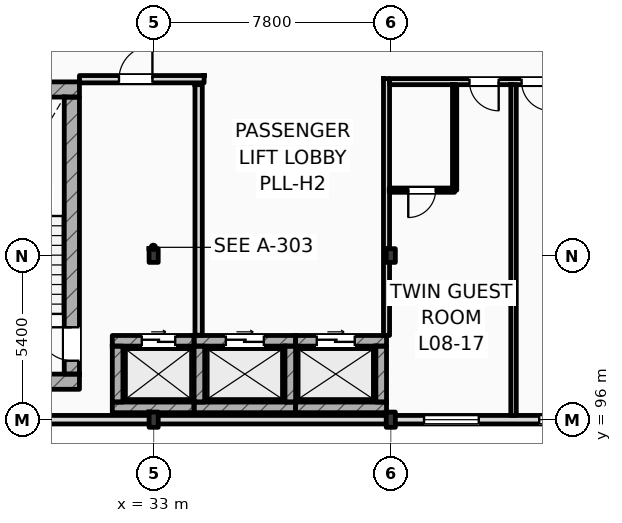
"""IFC4 building model, lengths in metres.
Left out: names, types, materials, properties, quantities, classifications, styles, units other than length and angle.
Written with IfcOpenShell. Run it as: python <this file> out.ifc"""

import sys

from ifc_helpers import new_model, si_unit, direction, frame, frame_2d, origin, origin_2d, place, context, subcontext, project, spatial, rectangle, i_section, extrude, element, fill, save


model = new_model("IFC4")
c1 = context("Model", 3, precision=1e-05, world=origin(), true_north=direction((0.0, 1.0)))
c2 = subcontext(c1, "Body", "Model", "MODEL_VIEW")
j1 = project(units=[si_unit("LENGTHUNIT", "METRE"), si_unit("PLANEANGLEUNIT", "RADIAN")], contexts=[c1])
p1 = place(None, origin())
s1 = spatial("IfcSite", under=j1, at=p1, CompositionType="ELEMENT")
p2 = place(p1, origin())
s2 = spatial("IfcBuilding", under=s1, at=p2, CompositionType="ELEMENT")
p3 = place(p2, frame((0.0, 0.0, 35.4)))
s3 = spatial("IfcBuildingStorey", under=s2, at=p3, CompositionType="ELEMENT", Elevation=35.4)
p4 = place(p3, frame((33.0, 96.0, 0.0), z_axis=(0.0, 0.0, 1.0), x_axis=(1.0, 0.0, 0.0)))
e1 = element("IfcColumn", 1, at=p4, inside=s3, PredefinedType="COLUMN", context=c2, shape_type="SweptSolid", body=[
    extrude(i_section(OverallWidth=0.3, OverallDepth=0.5, WebThickness=0.014, FlangeThickness=0.028, FilletRadius=0.027, at=origin_2d()), origin(), (0.0, 0.0, 1.0), 3.6),
])
p5 = place(p3, frame((33.0, 101.4, 0.0), z_axis=(0.0, 0.0, 1.0), x_axis=(1.0, 0.0, 0.0)))
e2 = element("IfcColumn", 2, at=p5, inside=s3, PredefinedType="COLUMN", context=c2, shape_type="SweptSolid", body=[
    extrude(i_section(OverallWidth=0.3, OverallDepth=0.45, WebThickness=0.014, FlangeThickness=0.026, FilletRadius=0.027, at=origin_2d()), origin(), (0.0, 0.0, 1.0), 3.6),
])
p6 = place(p3, frame((40.8, 96.0, 0.0), z_axis=(0.0, 0.0, 1.0), x_axis=(1.0, 0.0, 0.0)))
e3 = element("IfcColumn", 3, at=p6, inside=s3, PredefinedType="COLUMN", context=c2, shape_type="SweptSolid", body=[
    extrude(i_section(OverallWidth=0.3, OverallDepth=0.5, WebThickness=0.014, FlangeThickness=0.028, FilletRadius=0.027, at=origin_2d()), origin(), (0.0, 0.0, 1.0), 3.6),
])
p7 = place(p3, frame((40.8, 101.4, 0.0), z_axis=(0.0, 0.0, 1.0), x_axis=(1.0, 0.0, 0.0)))
e4 = element("IfcColumn", 4, at=p7, inside=s3, PredefinedType="COLUMN", context=c2, shape_type="SweptSolid", body=[
    extrude(i_section(OverallWidth=0.3, OverallDepth=0.45, WebThickness=0.014, FlangeThickness=0.026, FilletRadius=0.027, at=origin_2d()), origin(), (0.0, 0.0, 1.0), 3.6),
])
for number, where, z_axis, x_axis in (
    (5, (25.4, 106.862, 0.0), (0.0, 0.0, 1.0), (1.0, 0.0, 0.0)),
    (6, (25.4, 97.25, 0.0), (0.0, 0.0, 1.0), (1.0, 0.0, 0.0)),
):
    element("IfcWall", number, at=place(p3, frame(where, z_axis=z_axis, x_axis=x_axis)), inside=s3, PredefinedType="SHEAR", context=c2, shape_type="SweptSolid", body=[
        extrude(rectangle(XDim=5.16, YDim=0.5, at=frame_2d((2.58, 0.0))), origin(), (0.0, 0.0, 1.0), 3.6),
    ])
p8 = place(p3, frame((30.31, 97.5, 0.0), z_axis=(0.0, 0.0, 1.0), x_axis=(0.0, 1.0, 0.0)))
e7 = element("IfcWall", 7, at=p8, inside=s3, PredefinedType="SHEAR", context=c2, shape_type="SweptSolid", body=[
    extrude(rectangle(XDim=9.112, YDim=0.5, at=frame_2d((4.556, 0.0))), origin(), (0.0, 0.0, 1.0), 3.6),
])
p9 = place(p8, frame((0.44, 0.0, 0.0)))
e8 = element("IfcOpeningElement", 8, at=p9, cuts=e7, PredefinedType="OPENING", context=c2, shape_type="SweptSolid", body=[
    extrude(rectangle(XDim=1.1, YDim=2.2, at=frame_2d((0.55, 1.1))), frame((0.0, 0.26, 0.0), z_axis=(0.0, -1.0, 0.0), x_axis=(1.0, 0.0, 0.0)), (0.0, 0.0, 1.0), 0.52),
])
p10 = place(p3, frame((25.2, 96.0, 0.0), z_axis=(0.0, 0.0, 1.0), x_axis=(1.0, 0.0, 0.0)))
e9 = element("IfcWall", 9, at=p10, inside=s3, PredefinedType="STANDARD", context=c2, shape_type="SweptSolid", body=[
    extrude(rectangle(XDim=70.2, YDim=0.28, at=frame_2d((35.1, 0.0))), origin(), (0.0, 0.0, 1.0), 2.92),
])
p11 = place(p10, frame((16.694, 0.0, 0.9)))
e10 = element("IfcOpeningElement", 10, at=p11, cuts=e9, PredefinedType="OPENING", context=c2, shape_type="SweptSolid", body=[
    extrude(rectangle(XDim=1.8, YDim=1.84, at=frame_2d((0.9, 0.92))), frame((0.0, 0.15, 0.0), z_axis=(0.0, -1.0, 0.0), x_axis=(1.0, 0.0, 0.0)), (0.0, 0.0, 1.0), 0.3),
])
p12 = place(p10, frame((20.482, 0.0, 0.9)))
e11 = element("IfcOpeningElement", 11, at=p12, cuts=e9, PredefinedType="OPENING", context=c2, shape_type="SweptSolid", body=[
    extrude(rectangle(XDim=1.95, YDim=1.84, at=frame_2d((0.975, 0.92))), frame((0.0, 0.15, 0.0), z_axis=(0.0, -1.0, 0.0), x_axis=(1.0, 0.0, 0.0)), (0.0, 0.0, 1.0), 0.3),
])
p13 = place(p10, frame((24.316, 0.0, 0.9)))
e12 = element("IfcOpeningElement", 12, at=p13, cuts=e9, PredefinedType="OPENING", context=c2, shape_type="SweptSolid", body=[
    extrude(rectangle(XDim=2.1, YDim=1.84, at=frame_2d((1.05, 0.92))), frame((0.0, 0.15, 0.0), z_axis=(0.0, -1.0, 0.0), x_axis=(1.0, 0.0, 0.0)), (0.0, 0.0, 1.0), 0.3),
])
p14 = place(p10, frame((28.149, 0.0, 0.9)))
e13 = element("IfcOpeningElement", 13, at=p14, cuts=e9, PredefinedType="OPENING", context=c2, shape_type="SweptSolid", body=[
    extrude(rectangle(XDim=2.25, YDim=1.84, at=frame_2d((1.125, 0.92))), frame((0.0, 0.15, 0.0), z_axis=(0.0, -1.0, 0.0), x_axis=(1.0, 0.0, 0.0)), (0.0, 0.0, 1.0), 0.3),
])
p15 = place(p10, frame((31.983, 0.0, 0.9)))
e14 = element("IfcOpeningElement", 14, at=p15, cuts=e9, PredefinedType="OPENING", context=c2, shape_type="SweptSolid", body=[
    extrude(rectangle(XDim=2.4, YDim=1.84, at=frame_2d((1.2, 0.92))), frame((0.0, 0.15, 0.0), z_axis=(0.0, -1.0, 0.0), x_axis=(1.0, 0.0, 0.0)), (0.0, 0.0, 1.0), 0.3),
])
p16 = place(p10, frame((35.682, 0.0, 0.9)))
e15 = element("IfcOpeningElement", 15, at=p16, cuts=e9, PredefinedType="OPENING", context=c2, shape_type="SweptSolid", body=[
    extrude(rectangle(XDim=2.508, YDim=1.84, at=frame_2d((1.254, 0.92))), frame((0.0, 0.15, 0.0), z_axis=(0.0, -1.0, 0.0), x_axis=(1.0, 0.0, 0.0)), (0.0, 0.0, 1.0), 0.3),
])
p17 = place(p10, frame((55.56, 0.0, 0.9)))
e16 = element("IfcOpeningElement", 16, at=p17, cuts=e9, PredefinedType="OPENING", context=c2, shape_type="SweptSolid", body=[
    extrude(rectangle(XDim=1.8, YDim=1.84, at=frame_2d((0.9, 0.92))), frame((0.0, 0.15, 0.0), z_axis=(0.0, -1.0, 0.0), x_axis=(1.0, 0.0, 0.0)), (0.0, 0.0, 1.0), 0.3),
])
p18 = place(p10, frame((58.628, 0.0, 0.9)))
e17 = element("IfcOpeningElement", 17, at=p18, cuts=e9, PredefinedType="OPENING", context=c2, shape_type="SweptSolid", body=[
    extrude(rectangle(XDim=2.809, YDim=1.84, at=frame_2d((1.405, 0.92))), frame((0.0, 0.15, 0.0), z_axis=(0.0, -1.0, 0.0), x_axis=(1.0, 0.0, 0.0)), (0.0, 0.0, 1.0), 0.3),
])
p19 = place(p10, frame((63.257, 0.0, 0.9)))
e18 = element("IfcOpeningElement", 18, at=p19, cuts=e9, PredefinedType="OPENING", context=c2, shape_type="SweptSolid", body=[
    extrude(rectangle(XDim=1.8, YDim=1.84, at=frame_2d((0.9, 0.92))), frame((0.0, 0.15, 0.0), z_axis=(0.0, -1.0, 0.0), x_axis=(1.0, 0.0, 0.0)), (0.0, 0.0, 1.0), 0.3),
])
p20 = place(p10, frame((66.453, 0.0, 0.9)))
e19 = element("IfcOpeningElement", 19, at=p20, cuts=e9, PredefinedType="OPENING", context=c2, shape_type="SweptSolid", body=[
    extrude(rectangle(XDim=2.737, YDim=1.84, at=frame_2d((1.369, 0.92))), frame((0.0, 0.15, 0.0), z_axis=(0.0, -1.0, 0.0), x_axis=(1.0, 0.0, 0.0)), (0.0, 0.0, 1.0), 0.3),
])
p21 = place(p3, frame((31.64, 98.595, 0.0), z_axis=(0.0, 0.0, 1.0), x_axis=(1.0, 0.0, 0.0)))
e20 = element("IfcWall", 20, at=p21, inside=s3, PredefinedType="SHEAR", context=c2, shape_type="SweptSolid", body=[
    extrude(rectangle(XDim=2.69, YDim=0.35, at=frame_2d((1.345, 0.0))), origin(), (0.0, 0.0, 1.0), 3.38),
])
p22 = place(p21, frame((0.97, 0.0, 0.0)))
e21 = element("IfcOpeningElement", 21, at=p22, cuts=e20, PredefinedType="OPENING", context=c2, shape_type="SweptSolid", body=[
    extrude(rectangle(XDim=1.1, YDim=2.2, at=frame_2d((0.55, 1.1))), frame((0.0, 0.185, 0.0), z_axis=(0.0, -1.0, 0.0), x_axis=(1.0, 0.0, 0.0)), (0.0, 0.0, 1.0), 0.37),
])
p23 = place(p3, frame((31.64, 96.405, 0.0), z_axis=(0.0, 0.0, 1.0), x_axis=(1.0, 0.0, 0.0)))
e22 = element("IfcWall", 22, at=p23, inside=s3, PredefinedType="SHEAR", context=c2, shape_type="SweptSolid", body=[
    extrude(rectangle(XDim=2.69, YDim=0.35, at=frame_2d((1.345, 0.0))), origin(), (0.0, 0.0, 1.0), 3.38),
])
p24 = place(p3, frame((31.815, 96.58, 0.0), z_axis=(0.0, 0.0, 1.0), x_axis=(0.0, 1.0, 0.0)))
e23 = element("IfcWall", 23, at=p24, inside=s3, PredefinedType="SHEAR", context=c2, shape_type="SweptSolid", body=[
    extrude(rectangle(XDim=1.84, YDim=0.35, at=frame_2d((0.92, 0.0))), origin(), (0.0, 0.0, 1.0), 3.38),
])
p25 = place(p3, frame((34.33, 98.595, 0.0), z_axis=(0.0, 0.0, 1.0), x_axis=(1.0, 0.0, 0.0)))
e24 = element("IfcWall", 24, at=p25, inside=s3, PredefinedType="SHEAR", context=c2, shape_type="SweptSolid", body=[
    extrude(rectangle(XDim=3.34, YDim=0.35, at=frame_2d((1.67, 0.0))), origin(), (0.0, 0.0, 1.0), 3.38),
])
p26 = place(p25, frame((1.045, 0.0, 0.0)))
e25 = element("IfcOpeningElement", 25, at=p26, cuts=e24, PredefinedType="OPENING", context=c2, shape_type="SweptSolid", body=[
    extrude(rectangle(XDim=1.25, YDim=2.25, at=frame_2d((0.625, 1.125))), frame((0.0, 0.185, 0.0), z_axis=(0.0, -1.0, 0.0), x_axis=(1.0, 0.0, 0.0)), (0.0, 0.0, 1.0), 0.37),
])
p27 = place(p3, frame((34.33, 96.405, 0.0), z_axis=(0.0, 0.0, 1.0), x_axis=(1.0, 0.0, 0.0)))
e26 = element("IfcWall", 26, at=p27, inside=s3, PredefinedType="SHEAR", context=c2, shape_type="SweptSolid", body=[
    extrude(rectangle(XDim=3.34, YDim=0.35, at=frame_2d((1.67, 0.0))), origin(), (0.0, 0.0, 1.0), 3.38),
])
for number, where, z_axis, x_axis in (
    (27, (34.505, 96.58, 0.0), (0.0, 0.0, 1.0), (0.0, 1.0, 0.0)),
    (28, (37.495, 96.58, 0.0), (0.0, 0.0, 1.0), (0.0, 1.0, 0.0)),
):
    element("IfcWall", number, at=place(p3, frame(where, z_axis=z_axis, x_axis=x_axis)), inside=s3, PredefinedType="SHEAR", context=c2, shape_type="SweptSolid", body=[
        extrude(rectangle(XDim=1.84, YDim=0.35, at=frame_2d((0.92, 0.0))), origin(), (0.0, 0.0, 1.0), 3.38),
    ])
p28 = place(p3, frame((37.67, 98.595, 0.0), z_axis=(0.0, 0.0, 1.0), x_axis=(1.0, 0.0, 0.0)))
e29 = element("IfcWall", 29, at=p28, inside=s3, PredefinedType="SHEAR", context=c2, shape_type="SweptSolid", body=[
    extrude(rectangle(XDim=2.99, YDim=0.35, at=frame_2d((1.495, 0.0))), origin(), (0.0, 0.0, 1.0), 3.38),
])
p29 = place(p28, frame((0.695, 0.0, 0.0)))
e30 = element("IfcOpeningElement", 30, at=p29, cuts=e29, PredefinedType="OPENING", context=c2, shape_type="SweptSolid", body=[
    extrude(rectangle(XDim=1.25, YDim=2.25, at=frame_2d((0.625, 1.125))), frame((0.0, 0.185, 0.0), z_axis=(0.0, -1.0, 0.0), x_axis=(1.0, 0.0, 0.0)), (0.0, 0.0, 1.0), 0.37),
])
p30 = place(p3, frame((37.67, 96.405, 0.0), z_axis=(0.0, 0.0, 1.0), x_axis=(1.0, 0.0, 0.0)))
e31 = element("IfcWall", 31, at=p30, inside=s3, PredefinedType="SHEAR", context=c2, shape_type="SweptSolid", body=[
    extrude(rectangle(XDim=2.99, YDim=0.35, at=frame_2d((1.495, 0.0))), origin(), (0.0, 0.0, 1.0), 3.38),
])
p31 = place(p3, frame((40.485, 96.58, 0.0), z_axis=(0.0, 0.0, 1.0), x_axis=(0.0, 1.0, 0.0)))
e32 = element("IfcWall", 32, at=p31, inside=s3, PredefinedType="SHEAR", context=c2, shape_type="SweptSolid", body=[
    extrude(rectangle(XDim=1.84, YDim=0.35, at=frame_2d((0.92, 0.0))), origin(), (0.0, 0.0, 1.0), 3.01),
])
p32 = place(p3, frame((34.48, 98.78, 0.0), z_axis=(0.0, 0.0, 1.0), x_axis=(0.0, 1.0, 0.0)))
e33 = element("IfcWall", 33, at=p32, inside=s3, PredefinedType="STANDARD", context=c2, shape_type="SweptSolid", body=[
    extrude(rectangle(XDim=8.24, YDim=0.24, at=frame_2d((4.12, 0.0))), origin(), (0.0, 0.0, 1.0), 3.38),
])
p33 = place(p3, frame((30.56, 107.2, 0.0), z_axis=(0.0, 0.0, 1.0), x_axis=(1.0, 0.0, 0.0)))
e34 = element("IfcWall", 34, at=p33, inside=s3, PredefinedType="STANDARD", context=c2, shape_type="SweptSolid", body=[
    extrude(rectangle(XDim=4.1, YDim=0.24, at=frame_2d((2.05, 0.0))), origin(), (0.0, 0.0, 1.0), 3.38),
])
p34 = place(p33, frame((1.3, 0.0, 0.0)))
e35 = element("IfcOpeningElement", 35, at=p34, cuts=e34, PredefinedType="OPENING", context=c2, shape_type="SweptSolid", body=[
    extrude(rectangle(XDim=1.1, YDim=2.2, at=frame_2d((0.55, 1.1))), frame((0.0, 0.13, 0.0), z_axis=(0.0, -1.0, 0.0), x_axis=(1.0, 0.0, 0.0)), (0.0, 0.0, 1.0), 0.26),
])
p35 = place(p3, frame((40.76, 107.12, 0.0), z_axis=(0.0, 0.0, 1.0), x_axis=(1.0, 0.0, 0.0)))
e36 = element("IfcWall", 36, at=p35, inside=s3, PredefinedType="PARTITIONING", context=c2, shape_type="SweptSolid", body=[
    extrude(rectangle(XDim=23.44, YDim=0.2, at=frame_2d((11.72, 0.0))), origin(), (0.0, 0.0, 1.0), 3.38),
])
p36 = place(p35, frame((2.629, 0.0, 0.0)))
e37 = element("IfcOpeningElement", 37, at=p36, cuts=e36, PredefinedType="OPENING", context=c2, shape_type="SweptSolid", body=[
    extrude(rectangle(XDim=0.96, YDim=2.2, at=frame_2d((0.48, 1.1))), frame((0.0, 0.11, 0.0), z_axis=(0.0, -1.0, 0.0), x_axis=(1.0, 0.0, 0.0)), (0.0, 0.0, 1.0), 0.22),
])
p37 = place(p35, frame((4.343, 0.0, 0.0)))
e38 = element("IfcOpeningElement", 38, at=p37, cuts=e36, PredefinedType="OPENING", context=c2, shape_type="SweptSolid", body=[
    extrude(rectangle(XDim=0.96, YDim=2.2, at=frame_2d((0.48, 1.1))), frame((0.0, 0.11, 0.0), z_axis=(0.0, -1.0, 0.0), x_axis=(1.0, 0.0, 0.0)), (0.0, 0.0, 1.0), 0.22),
])
p38 = place(p35, frame((10.401, 0.0, 0.0)))
e39 = element("IfcOpeningElement", 39, at=p38, cuts=e36, PredefinedType="OPENING", context=c2, shape_type="SweptSolid", body=[
    extrude(rectangle(XDim=0.96, YDim=2.2, at=frame_2d((0.48, 1.1))), frame((0.0, 0.11, 0.0), z_axis=(0.0, -1.0, 0.0), x_axis=(1.0, 0.0, 0.0)), (0.0, 0.0, 1.0), 0.22),
])
p39 = place(p35, frame((12.159, 0.0, 0.0)))
e40 = element("IfcOpeningElement", 40, at=p39, cuts=e36, PredefinedType="OPENING", context=c2, shape_type="SweptSolid", body=[
    extrude(rectangle(XDim=0.96, YDim=2.2, at=frame_2d((0.48, 1.1))), frame((0.0, 0.11, 0.0), z_axis=(0.0, -1.0, 0.0), x_axis=(1.0, 0.0, 0.0)), (0.0, 0.0, 1.0), 0.22),
])
p40 = place(p35, frame((18.218, 0.0, 0.0)))
e41 = element("IfcOpeningElement", 41, at=p40, cuts=e36, PredefinedType="OPENING", context=c2, shape_type="SweptSolid", body=[
    extrude(rectangle(XDim=0.96, YDim=2.2, at=frame_2d((0.48, 1.1))), frame((0.0, 0.11, 0.0), z_axis=(0.0, -1.0, 0.0), x_axis=(1.0, 0.0, 0.0)), (0.0, 0.0, 1.0), 0.22),
])
p41 = place(p35, frame((20.021, 0.0, 0.0)))
e42 = element("IfcOpeningElement", 42, at=p41, cuts=e36, PredefinedType="OPENING", context=c2, shape_type="SweptSolid", body=[
    extrude(rectangle(XDim=0.96, YDim=2.2, at=frame_2d((0.48, 1.1))), frame((0.0, 0.11, 0.0), z_axis=(0.0, -1.0, 0.0), x_axis=(1.0, 0.0, 0.0)), (0.0, 0.0, 1.0), 0.22),
])
p42 = place(p3, frame((40.66, 98.77, 0.0), z_axis=(0.0, 0.0, 1.0), x_axis=(0.0, 1.0, 0.0)))
e43 = element("IfcWall", 43, at=p42, inside=s3, PredefinedType="PARTITIONING", context=c2, shape_type="SweptSolid", body=[
    extrude(rectangle(XDim=8.45, YDim=0.2, at=frame_2d((4.225, 0.0))), origin(), (0.0, 0.0, 1.0), 3.01),
])
p43 = place(p3, frame((44.838, 96.14, 0.0), z_axis=(0.0, 0.0, 1.0), x_axis=(0.0, 1.0, 0.0)))
e44 = element("IfcWall", 44, at=p43, inside=s3, PredefinedType="PARTITIONING", context=c2, shape_type="SweptSolid", body=[
    extrude(rectangle(XDim=10.88, YDim=0.18, at=frame_2d((5.44, 0.0))), origin(), (0.0, 0.0, 1.0), 3.38),
])
p44 = place(p3, frame((42.9, 103.55, 0.0), z_axis=(0.0, 0.0, 1.0), x_axis=(0.0, 1.0, 0.0)))
e45 = element("IfcWall", 45, at=p44, inside=s3, PredefinedType="PARTITIONING", context=c2, shape_type="SweptSolid", body=[
    extrude(rectangle(XDim=3.47, YDim=0.14, at=frame_2d((1.735, 0.0))), origin(), (0.0, 0.0, 1.0), 3.38),
])
p45 = place(p3, frame((40.75, 103.55, 0.0), z_axis=(0.0, 0.0, 1.0), x_axis=(1.0, 0.0, 0.0)))
e46 = element("IfcWall", 46, at=p45, inside=s3, PredefinedType="PARTITIONING", context=c2, shape_type="SweptSolid", body=[
    extrude(rectangle(XDim=2.15, YDim=0.14, at=frame_2d((1.075, 0.0))), origin(), (0.0, 0.0, 1.0), 3.38),
])
p46 = place(p45, frame((0.625, 0.0, 0.0)))
e47 = element("IfcOpeningElement", 47, at=p46, cuts=e46, PredefinedType="OPENING", context=c2, shape_type="SweptSolid", body=[
    extrude(rectangle(XDim=0.9, YDim=2.1, at=frame_2d((0.45, 1.05))), frame((0.0, 0.08, 0.0), z_axis=(0.0, -1.0, 0.0), x_axis=(1.0, 0.0, 0.0)), (0.0, 0.0, 1.0), 0.16),
])
p47 = place(p11, origin())
e48 = element("IfcWindow", 48, at=p47, inside=s3, PartitioningType="DOUBLE_PANEL_VERTICAL", PredefinedType="WINDOW", context=c2, shape_type="SweptSolid", body=[
    extrude(rectangle(XDim=1.8, YDim=1.84, at=frame_2d((0.9, 0.92))), frame((0.0, 0.03, 0.0), z_axis=(0.0, -1.0, 0.0), x_axis=(1.0, 0.0, 0.0)), (0.0, 0.0, 1.0), 0.06),
])
fill(e10, e48)
p48 = place(p12, origin())
e49 = element("IfcWindow", 49, at=p48, inside=s3, PartitioningType="DOUBLE_PANEL_VERTICAL", PredefinedType="WINDOW", context=c2, shape_type="SweptSolid", body=[
    extrude(rectangle(XDim=1.95, YDim=1.84, at=frame_2d((0.975, 0.92))), frame((0.0, 0.03, 0.0), z_axis=(0.0, -1.0, 0.0), x_axis=(1.0, 0.0, 0.0)), (0.0, 0.0, 1.0), 0.06),
])
fill(e11, e49)
p49 = place(p9, origin())
e50 = element("IfcDoor", 50, at=p49, inside=s3, OperationType="SINGLE_SWING_RIGHT", PredefinedType="DOOR", context=c2, shape_type="SweptSolid", body=[
    extrude(rectangle(XDim=1.1, YDim=2.2, at=frame_2d((0.55, 1.1))), frame((0.0, 0.025, 0.0), z_axis=(0.0, -1.0, 0.0), x_axis=(1.0, 0.0, 0.0)), (0.0, 0.0, 1.0), 0.05),
])
fill(e8, e50)
p50 = place(p22, origin())
e51 = element("IfcDoor", 51, at=p50, inside=s3, OperationType="SLIDING_TO_LEFT", PredefinedType="DOOR", context=c2, shape_type="SweptSolid", body=[
    extrude(rectangle(XDim=1.1, YDim=2.2, at=frame_2d((0.55, 1.1))), frame((0.0, 0.025, 0.0), z_axis=(0.0, -1.0, 0.0), x_axis=(1.0, 0.0, 0.0)), (0.0, 0.0, 1.0), 0.05),
])
fill(e21, e51)
p51 = place(p26, origin())
e52 = element("IfcDoor", 52, at=p51, inside=s3, OperationType="SLIDING_TO_LEFT", PredefinedType="DOOR", context=c2, shape_type="SweptSolid", body=[
    extrude(rectangle(XDim=1.25, YDim=2.25, at=frame_2d((0.625, 1.125))), frame((0.0, 0.025, 0.0), z_axis=(0.0, -1.0, 0.0), x_axis=(1.0, 0.0, 0.0)), (0.0, 0.0, 1.0), 0.05),
])
fill(e25, e52)
p52 = place(p29, origin())
e53 = element("IfcDoor", 53, at=p52, inside=s3, OperationType="SLIDING_TO_LEFT", PredefinedType="DOOR", context=c2, shape_type="SweptSolid", body=[
    extrude(rectangle(XDim=1.25, YDim=2.25, at=frame_2d((0.625, 1.125))), frame((0.0, 0.025, 0.0), z_axis=(0.0, -1.0, 0.0), x_axis=(1.0, 0.0, 0.0)), (0.0, 0.0, 1.0), 0.05),
])
fill(e30, e53)
p53 = place(p34, origin())
e54 = element("IfcDoor", 54, at=p53, inside=s3, OperationType="SINGLE_SWING_RIGHT", PredefinedType="DOOR", context=c2, shape_type="SweptSolid", body=[
    extrude(rectangle(XDim=1.1, YDim=2.2, at=frame_2d((0.55, 1.1))), frame((0.0, 0.025, 0.0), z_axis=(0.0, -1.0, 0.0), x_axis=(1.0, 0.0, 0.0)), (0.0, 0.0, 1.0), 0.05),
])
fill(e35, e54)
p54 = place(p36, frame((0.96, 0.0, 0.0), z_axis=(0.0, 0.0, 1.0), x_axis=(-1.0, 0.0, 0.0)))
e55 = element("IfcDoor", 55, at=p54, inside=s3, OperationType="SINGLE_SWING_RIGHT", PredefinedType="DOOR", context=c2, shape_type="SweptSolid", body=[
    extrude(rectangle(XDim=0.96, YDim=2.2, at=frame_2d((0.48, 1.1))), frame((0.0, 0.025, 0.0), z_axis=(0.0, -1.0, 0.0), x_axis=(1.0, 0.0, 0.0)), (0.0, 0.0, 1.0), 0.05),
])
fill(e37, e55)
p55 = place(p46, frame((0.9, 0.0, 0.0), z_axis=(0.0, 0.0, 1.0), x_axis=(-1.0, 0.0, 0.0)))
e56 = element("IfcDoor", 56, at=p55, inside=s3, OperationType="SINGLE_SWING_LEFT", PredefinedType="DOOR", context=c2, shape_type="SweptSolid", body=[
    extrude(rectangle(XDim=0.9, YDim=2.1, at=frame_2d((0.45, 1.05))), frame((0.0, 0.025, 0.0), z_axis=(0.0, -1.0, 0.0), x_axis=(1.0, 0.0, 0.0)), (0.0, 0.0, 1.0), 0.05),
])
fill(e47, e56)
p56 = place(p37, frame((0.96, 0.0, 0.0), z_axis=(0.0, 0.0, 1.0), x_axis=(-1.0, 0.0, 0.0)))
e57 = element("IfcDoor", 57, at=p56, inside=s3, OperationType="SINGLE_SWING_RIGHT", PredefinedType="DOOR", context=c2, shape_type="SweptSolid", body=[
    extrude(rectangle(XDim=0.96, YDim=2.2, at=frame_2d((0.48, 1.1))), frame((0.0, 0.025, 0.0), z_axis=(0.0, -1.0, 0.0), x_axis=(1.0, 0.0, 0.0)), (0.0, 0.0, 1.0), 0.05),
])
fill(e38, e57)
save(model, sys.argv[1])
